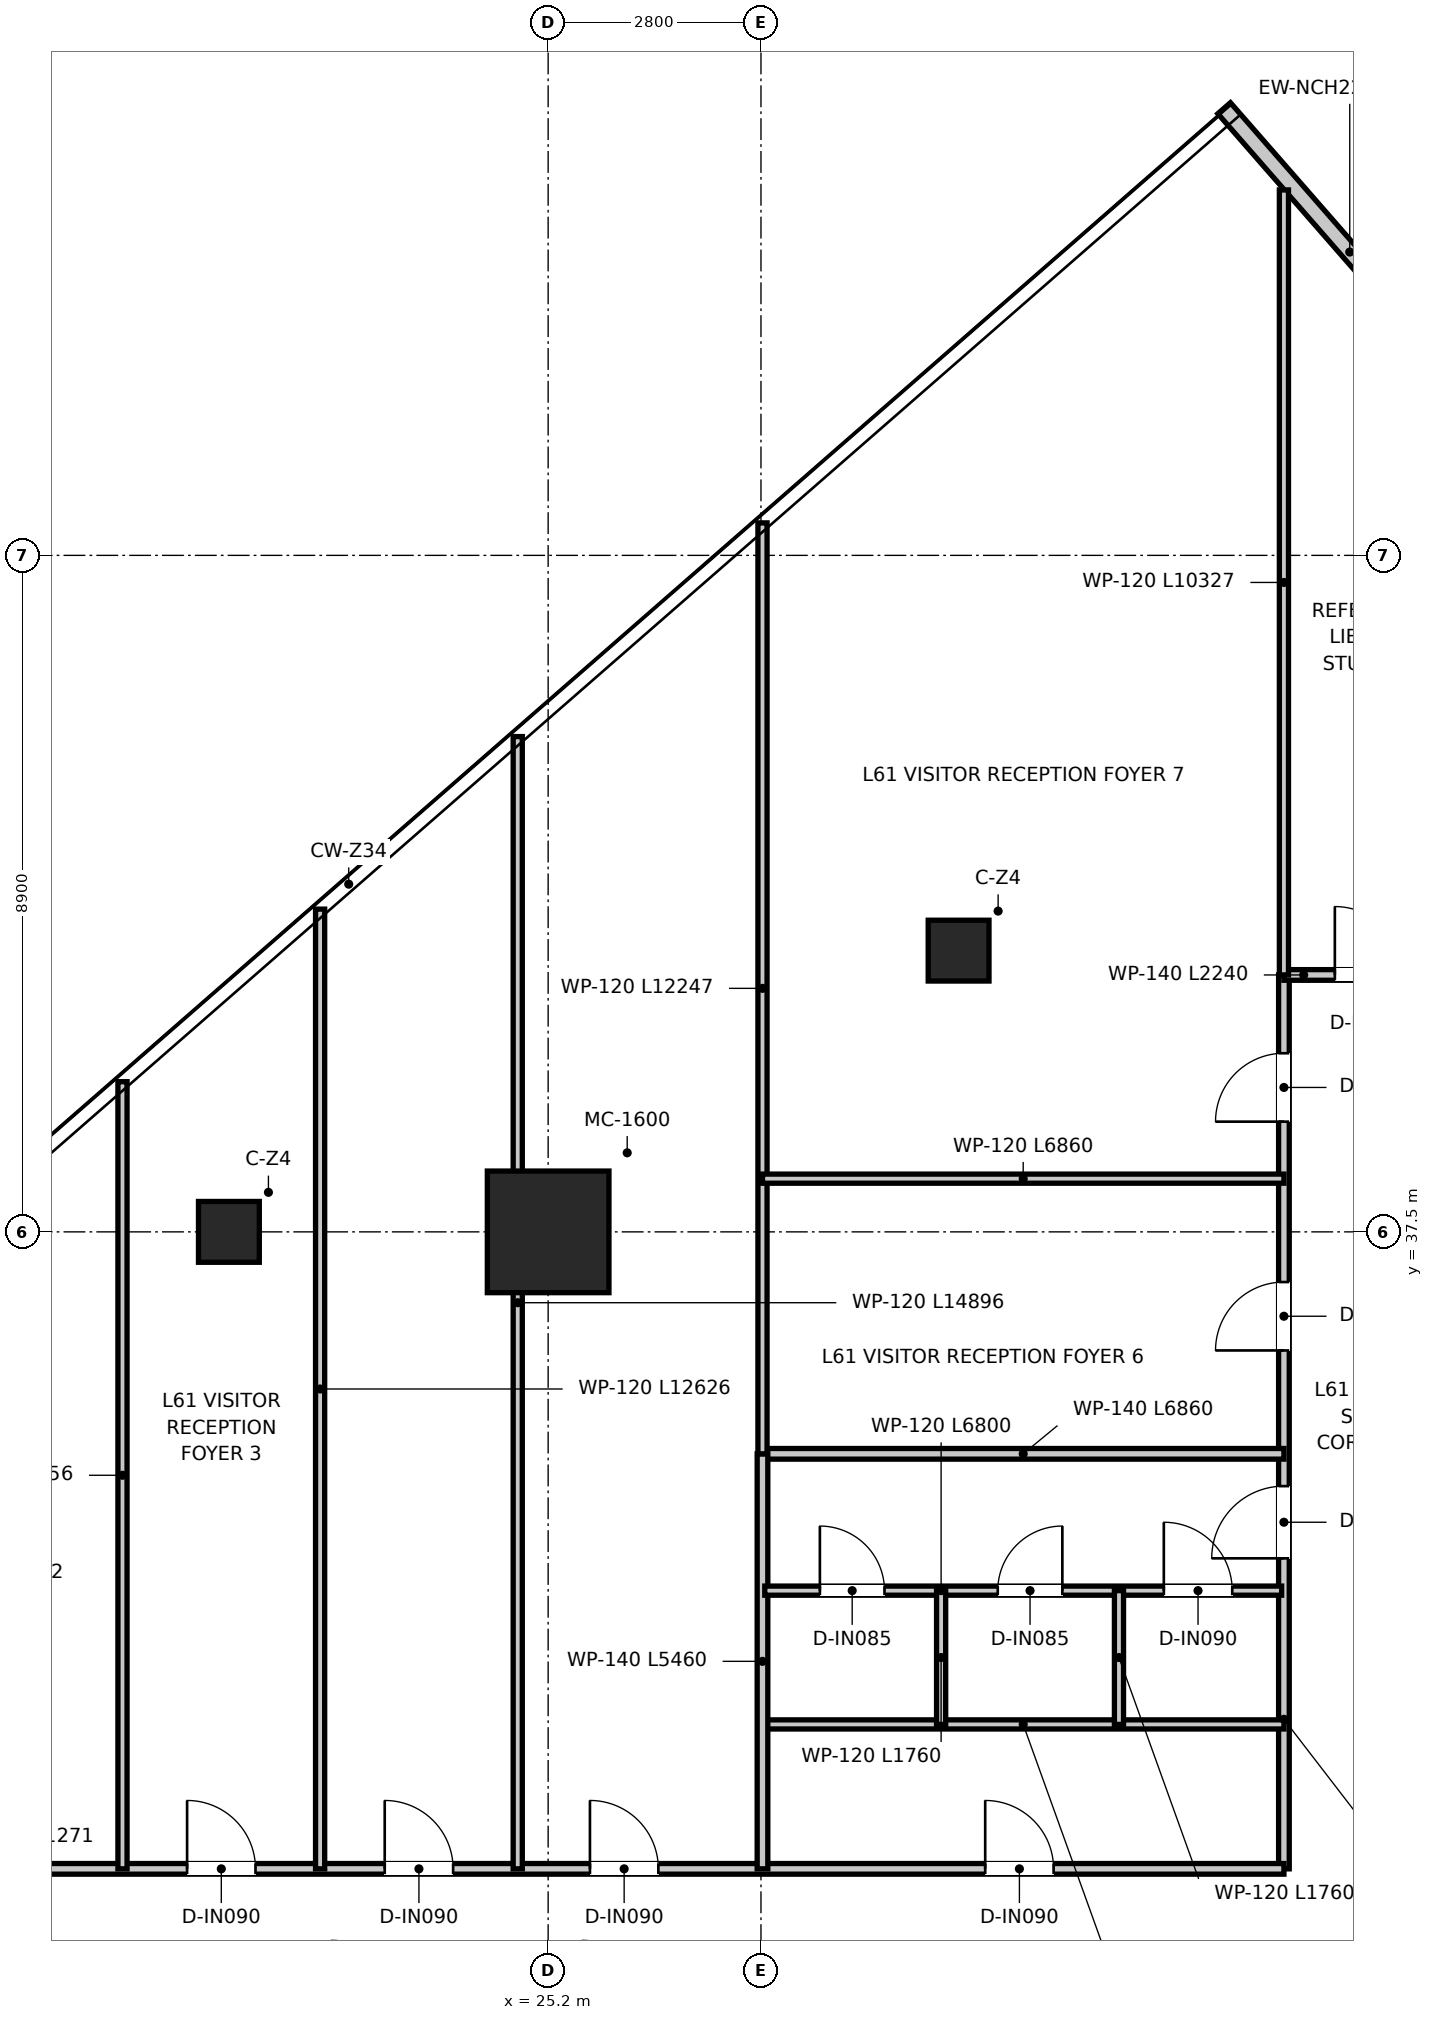
"""IFC4 building model, lengths in metres.
Left out: names, types, materials, properties, quantities, classifications, styles, units other than length and angle.
Written with IfcOpenShell. Run it as: python <this file> out.ifc"""

import sys

from ifc_helpers import new_model, si_unit, direction, frame, frame_2d, origin, origin_2d, place, context, subcontext, project, spatial, rectangle, extrude, source, transform, mapped, element, fill, save


model = new_model("IFC4")
c1 = context("Model", 3, precision=1e-05, world=origin(), true_north=direction((0.0, 1.0)))
c2 = subcontext(c1, "Body", "Model", "MODEL_VIEW")
j1 = project(units=[si_unit("LENGTHUNIT", "METRE"), si_unit("PLANEANGLEUNIT", "RADIAN")], contexts=[c1])
p1 = place(None, origin())
s1 = spatial("IfcSite", under=j1, at=p1, CompositionType="ELEMENT")
p2 = place(p1, origin())
s2 = spatial("IfcBuilding", under=s1, at=p2, CompositionType="ELEMENT")
p3 = place(p2, frame((0.0, 0.0, 250.75)))
s3 = spatial("IfcBuildingStorey", under=s2, at=p3, CompositionType="ELEMENT", Elevation=250.75)
m1 = source(origin(), c2, "Body", "SweptSolid", [
    extrude(rectangle(XDim=1.6, YDim=1.6, at=origin_2d()), origin(), (0.0, 0.0, 1.0), 3.95),
])
p4 = place(p3, frame((25.2, 37.5, 0.0), z_axis=(0.0, 0.0, 1.0), x_axis=(1.0, 0.0, 0.0)))
e1 = element("IfcColumn", 1, at=p4, inside=s3, PredefinedType="USERDEFINED", context=c2, shape_type="MappedRepresentation", body=[
    mapped(m1, transform((0.0, 0.0, 0.0), x_axis=(1.0, 0.0, 0.0), y_axis=(0.0, 1.0, 0.0), z_axis=(0.0, 0.0, 1.0), scale=1.0)),
])
m2 = source(origin(), c2, "Body", "SweptSolid", [
    extrude(rectangle(XDim=0.8, YDim=0.8, at=origin_2d()), origin(), (0.0, 0.0, 1.0), 3.95),
])
for number, where, z_axis, x_axis in (
    (2, (21.0, 37.5, 0.0), (0.0, 0.0, 1.0), (1.0, 0.0, 0.0)),
    (3, (30.6, 41.2, 0.0), (0.0, 0.0, 1.0), (1.0, 0.0, 0.0)),
):
    element("IfcColumn", number, at=place(p3, frame(where, z_axis=z_axis, x_axis=x_axis)), inside=s3, PredefinedType="COLUMN", context=c2, shape_type="MappedRepresentation", body=[
        mapped(m2, transform((0.0, 0.0, 0.0), x_axis=(1.0, 0.0, 0.0), y_axis=(0.0, 1.0, 0.0), z_axis=(0.0, 0.0, 1.0), scale=1.0)),
    ])
p5 = place(p3, frame((37.398, 48.498, 0.0), z_axis=(0.0, 0.0, 1.0), x_axis=(-0.657706226339, 0.753274531518, 0.0)))
e4 = element("IfcWall", 4, at=p5, inside=s3, PredefinedType="ELEMENTEDWALL", context=c2, shape_type="SweptSolid", body=[
    extrude(rectangle(XDim=5.025, YDim=0.22, at=frame_2d((2.512, 0.0))), origin(), (0.0, 0.0, 1.0), 3.67),
])
p6 = place(p3, frame((34.88, 29.12, 0.0), z_axis=(0.0, 0.0, 1.0), x_axis=(0.0, 1.0, 0.0)))
e5 = element("IfcWall", 5, at=p6, inside=s3, PredefinedType="PARTITIONING", context=c2, shape_type="SweptSolid", body=[
    extrude(rectangle(XDim=11.76, YDim=0.14, at=frame_2d((5.88, 0.0))), origin(), (0.0, 0.0, 1.0), 3.03),
])
p7 = place(p6, frame((4.085, 0.0, 0.0)))
e6 = element("IfcOpeningElement", 6, at=p7, cuts=e5, PredefinedType="OPENING", context=c2, shape_type="SweptSolid", body=[
    extrude(rectangle(XDim=0.95, YDim=2.1, at=frame_2d((0.475, 1.05))), frame((0.0, 0.08, 0.0), z_axis=(0.0, -1.0, 0.0), x_axis=(1.0, 0.0, 0.0)), (0.0, 0.0, 1.0), 0.16),
])
p8 = place(p6, frame((6.82, 0.0, 0.0)))
e7 = element("IfcOpeningElement", 7, at=p8, cuts=e5, PredefinedType="OPENING", context=c2, shape_type="SweptSolid", body=[
    extrude(rectangle(XDim=0.9, YDim=2.1, at=frame_2d((0.45, 1.05))), frame((0.0, 0.08, 0.0), z_axis=(0.0, -1.0, 0.0), x_axis=(1.0, 0.0, 0.0)), (0.0, 0.0, 1.0), 0.16),
])
p9 = place(p6, frame((9.83, 0.0, 0.0)))
e8 = element("IfcOpeningElement", 8, at=p9, cuts=e5, PredefinedType="OPENING", context=c2, shape_type="SweptSolid", body=[
    extrude(rectangle(XDim=0.9, YDim=2.1, at=frame_2d((0.45, 1.05))), frame((0.0, 0.08, 0.0), z_axis=(0.0, -1.0, 0.0), x_axis=(1.0, 0.0, 0.0)), (0.0, 0.0, 1.0), 0.16),
])
p10 = place(p3, frame((34.88, 40.88, 0.0), z_axis=(0.0, 0.0, 1.0), x_axis=(1.0, 0.0, 0.0)))
e9 = element("IfcWall", 9, at=p10, inside=s3, PredefinedType="PARTITIONING", context=c2, shape_type="SweptSolid", body=[
    extrude(rectangle(XDim=2.24, YDim=0.14, at=frame_2d((1.12, 0.0))), origin(), (0.0, 0.0, 1.0), 3.67),
])
p11 = place(p10, frame((0.67, 0.0, 0.0)))
e10 = element("IfcOpeningElement", 10, at=p11, cuts=e9, PredefinedType="OPENING", context=c2, shape_type="SweptSolid", body=[
    extrude(rectangle(XDim=0.9, YDim=2.1, at=frame_2d((0.45, 1.05))), frame((0.0, 0.08, 0.0), z_axis=(0.0, -1.0, 0.0), x_axis=(1.0, 0.0, 0.0)), (0.0, 0.0, 1.0), 0.16),
])
p12 = place(p3, frame((13.609, 29.12, 0.0), z_axis=(0.0, 0.0, 1.0), x_axis=(1.0, 0.0, 0.0)))
e11 = element("IfcWall", 11, at=p12, inside=s3, PredefinedType="PARTITIONING", context=c2, shape_type="SweptSolid", body=[
    extrude(rectangle(XDim=21.271, YDim=0.14, at=frame_2d((10.635, 0.0))), origin(), (0.0, 0.0, 1.0), 3.03),
])
p13 = place(p12, frame((17.341, 0.0, 0.0)))
e12 = element("IfcOpeningElement", 12, at=p13, cuts=e11, PredefinedType="OPENING", context=c2, shape_type="SweptSolid", body=[
    extrude(rectangle(XDim=0.9, YDim=2.1, at=frame_2d((0.45, 1.05))), frame((0.0, 0.08, 0.0), z_axis=(0.0, -1.0, 0.0), x_axis=(1.0, 0.0, 0.0)), (0.0, 0.0, 1.0), 0.16),
])
p14 = place(p12, frame((1.478, 0.0, 0.0)))
e13 = element("IfcOpeningElement", 13, at=p14, cuts=e11, PredefinedType="OPENING", context=c2, shape_type="SweptSolid", body=[
    extrude(rectangle(XDim=0.9, YDim=2.1, at=frame_2d((0.45, 1.05))), frame((0.0, 0.08, 0.0), z_axis=(0.0, -1.0, 0.0), x_axis=(1.0, 0.0, 0.0)), (0.0, 0.0, 1.0), 0.16),
])
p15 = place(p12, frame((6.841, 0.0, 0.0)))
e14 = element("IfcOpeningElement", 14, at=p15, cuts=e11, PredefinedType="OPENING", context=c2, shape_type="SweptSolid", body=[
    extrude(rectangle(XDim=0.9, YDim=2.1, at=frame_2d((0.45, 1.05))), frame((0.0, 0.08, 0.0), z_axis=(0.0, -1.0, 0.0), x_axis=(1.0, 0.0, 0.0)), (0.0, 0.0, 1.0), 0.16),
])
p16 = place(p12, frame((9.441, 0.0, 0.0)))
e15 = element("IfcOpeningElement", 15, at=p16, cuts=e11, PredefinedType="OPENING", context=c2, shape_type="SweptSolid", body=[
    extrude(rectangle(XDim=0.9, YDim=2.1, at=frame_2d((0.45, 1.05))), frame((0.0, 0.08, 0.0), z_axis=(0.0, -1.0, 0.0), x_axis=(1.0, 0.0, 0.0)), (0.0, 0.0, 1.0), 0.16),
])
p17 = place(p12, frame((12.141, 0.0, 0.0)))
e16 = element("IfcOpeningElement", 16, at=p17, cuts=e11, PredefinedType="OPENING", context=c2, shape_type="SweptSolid", body=[
    extrude(rectangle(XDim=0.9, YDim=2.1, at=frame_2d((0.45, 1.05))), frame((0.0, 0.08, 0.0), z_axis=(0.0, -1.0, 0.0), x_axis=(1.0, 0.0, 0.0)), (0.0, 0.0, 1.0), 0.16),
])
p18 = place(p3, frame((28.02, 31.02, 0.0), z_axis=(0.0, 0.0, 1.0), x_axis=(1.0, 0.0, 0.0)))
e17 = element("IfcWall", 17, at=p18, inside=s3, PredefinedType="PARTITIONING", context=c2, shape_type="SweptSolid", body=[
    extrude(rectangle(XDim=6.86, YDim=0.12, at=frame_2d((3.43, 0.0))), origin(), (0.0, 0.0, 1.0), 3.18),
])
p19 = place(p3, frame((28.02, 34.58, 0.0), z_axis=(0.0, 0.0, 1.0), x_axis=(1.0, 0.0, 0.0)))
e18 = element("IfcWall", 18, at=p19, inside=s3, PredefinedType="PARTITIONING", context=c2, shape_type="SweptSolid", body=[
    extrude(rectangle(XDim=6.86, YDim=0.14, at=frame_2d((3.43, 0.0))), origin(), (0.0, 0.0, 1.0), 3.18),
])
p20 = place(p3, frame((28.02, 29.12, 0.0), z_axis=(0.0, 0.0, 1.0), x_axis=(0.0, 1.0, 0.0)))
e19 = element("IfcWall", 19, at=p20, inside=s3, PredefinedType="PARTITIONING", context=c2, shape_type="SweptSolid", body=[
    extrude(rectangle(XDim=5.46, YDim=0.14, at=frame_2d((2.73, 0.0))), origin(), (0.0, 0.0, 1.0), 3.37),
])
p21 = place(p3, frame((28.05, 32.78, 0.0), z_axis=(0.0, 0.0, 1.0), x_axis=(1.0, 0.0, 0.0)))
e20 = element("IfcWall", 20, at=p21, inside=s3, PredefinedType="PARTITIONING", context=c2, shape_type="SweptSolid", body=[
    extrude(rectangle(XDim=6.8, YDim=0.12, at=frame_2d((3.4, 0.0))), origin(), (0.0, 0.0, 1.0), 3.18),
])
p22 = place(p21, frame((0.725, 0.0, 0.0)))
e21 = element("IfcOpeningElement", 21, at=p22, cuts=e20, PredefinedType="OPENING", context=c2, shape_type="SweptSolid", body=[
    extrude(rectangle(XDim=0.85, YDim=2.1, at=frame_2d((0.425, 1.05))), frame((0.0, 0.07, 0.0), z_axis=(0.0, -1.0, 0.0), x_axis=(1.0, 0.0, 0.0)), (0.0, 0.0, 1.0), 0.14),
])
p23 = place(p21, frame((3.065, 0.0, 0.0)))
e22 = element("IfcOpeningElement", 22, at=p23, cuts=e20, PredefinedType="OPENING", context=c2, shape_type="SweptSolid", body=[
    extrude(rectangle(XDim=0.85, YDim=2.1, at=frame_2d((0.425, 1.05))), frame((0.0, 0.07, 0.0), z_axis=(0.0, -1.0, 0.0), x_axis=(1.0, 0.0, 0.0)), (0.0, 0.0, 1.0), 0.14),
])
p24 = place(p21, frame((5.25, 0.0, 0.0)))
e23 = element("IfcOpeningElement", 23, at=p24, cuts=e20, PredefinedType="OPENING", context=c2, shape_type="SweptSolid", body=[
    extrude(rectangle(XDim=0.9, YDim=2.1, at=frame_2d((0.45, 1.05))), frame((0.0, 0.07, 0.0), z_axis=(0.0, -1.0, 0.0), x_axis=(1.0, 0.0, 0.0)), (0.0, 0.0, 1.0), 0.14),
])
p25 = place(p3, frame((30.37, 31.02, 0.0), z_axis=(0.0, 0.0, 1.0), x_axis=(0.0, 1.0, 0.0)))
e24 = element("IfcWall", 24, at=p25, inside=s3, PredefinedType="PARTITIONING", context=c2, shape_type="SweptSolid", body=[
    extrude(rectangle(XDim=1.76, YDim=0.12, at=frame_2d((0.88, 0.0))), origin(), (0.0, 0.0, 1.0), 3.18),
])
p26 = place(p3, frame((32.71, 31.02, 0.0), z_axis=(0.0, 0.0, 1.0), x_axis=(0.0, 1.0, 0.0)))
e25 = element("IfcWall", 25, at=p26, inside=s3, PredefinedType="PARTITIONING", context=c2, shape_type="SweptSolid", body=[
    extrude(rectangle(XDim=1.76, YDim=0.12, at=frame_2d((0.88, 0.0))), origin(), (0.0, 0.0, 1.0), 3.67),
])
p27 = place(p3, frame((34.88, 40.88, 0.0), z_axis=(0.0, 0.0, 1.0), x_axis=(0.0, 1.0, 0.0)))
e26 = element("IfcWall", 26, at=p27, inside=s3, PredefinedType="PARTITIONING", context=c2, shape_type="SweptSolid", body=[
    extrude(rectangle(XDim=10.328, YDim=0.12, at=frame_2d((5.164, 0.0))), origin(), (0.0, 0.0, 1.0), 3.28),
])
p28 = place(p3, frame((19.6, 29.12, 0.0), z_axis=(0.0, 0.0, 1.0), x_axis=(0.0, 1.0, 0.0)))
e27 = element("IfcWall", 27, at=p28, inside=s3, PredefinedType="PARTITIONING", context=c2, shape_type="SweptSolid", body=[
    extrude(rectangle(XDim=10.355, YDim=0.12, at=frame_2d((5.178, 0.0))), origin(), (0.0, 0.0, 1.0), 3.67),
])
p29 = place(p3, frame((22.2, 29.12, 0.0), z_axis=(0.0, 0.0, 1.0), x_axis=(0.0, 1.0, 0.0)))
e28 = element("IfcWall", 28, at=p29, inside=s3, PredefinedType="PARTITIONING", context=c2, shape_type="SweptSolid", body=[
    extrude(rectangle(XDim=12.626, YDim=0.12, at=frame_2d((6.313, 0.0))), origin(), (0.0, 0.0, 1.0), 3.18),
])
p30 = place(p3, frame((24.8, 29.12, 0.0), z_axis=(0.0, 0.0, 1.0), x_axis=(0.0, 1.0, 0.0)))
e29 = element("IfcWall", 29, at=p30, inside=s3, PredefinedType="PARTITIONING", context=c2, shape_type="SweptSolid", body=[
    extrude(rectangle(XDim=14.896, YDim=0.12, at=frame_2d((7.448, 0.0))), origin(), (0.0, 0.0, 1.0), 3.18),
])
p31 = place(p3, frame((28.02, 34.58, 0.0), z_axis=(0.0, 0.0, 1.0), x_axis=(0.0, 1.0, 0.0)))
e30 = element("IfcWall", 30, at=p31, inside=s3, PredefinedType="PARTITIONING", context=c2, shape_type="SweptSolid", body=[
    extrude(rectangle(XDim=12.247, YDim=0.12, at=frame_2d((6.124, 0.0))), origin(), (0.0, 0.0, 1.0), 3.03),
])
p32 = place(p3, frame((28.02, 38.2, 0.0), z_axis=(0.0, 0.0, 1.0), x_axis=(1.0, 0.0, 0.0)))
e31 = element("IfcWall", 31, at=p32, inside=s3, PredefinedType="PARTITIONING", context=c2, shape_type="SweptSolid", body=[
    extrude(rectangle(XDim=6.86, YDim=0.12, at=frame_2d((3.43, 0.0))), origin(), (0.0, 0.0, 1.0), 3.18),
])
p33 = place(p13, origin())
e32 = element("IfcDoor", 32, at=p33, inside=s3, OperationType="SINGLE_SWING_LEFT", PredefinedType="DOOR", context=c2, shape_type="SweptSolid", body=[
    extrude(rectangle(XDim=0.9, YDim=2.1, at=frame_2d((0.45, 1.05))), frame((0.0, 0.025, 0.0), z_axis=(0.0, -1.0, 0.0), x_axis=(1.0, 0.0, 0.0)), (0.0, 0.0, 1.0), 0.05),
])
fill(e12, e32)
p34 = place(p7, origin())
e33 = element("IfcDoor", 33, at=p34, inside=s3, OperationType="SINGLE_SWING_LEFT", PredefinedType="DOOR", context=c2, shape_type="SweptSolid", body=[
    extrude(rectangle(XDim=0.95, YDim=2.1, at=frame_2d((0.475, 1.05))), frame((0.0, 0.025, 0.0), z_axis=(0.0, -1.0, 0.0), x_axis=(1.0, 0.0, 0.0)), (0.0, 0.0, 1.0), 0.05),
])
fill(e6, e33)
p35 = place(p22, origin())
e34 = element("IfcDoor", 34, at=p35, inside=s3, OperationType="SINGLE_SWING_LEFT", PredefinedType="DOOR", context=c2, shape_type="SweptSolid", body=[
    extrude(rectangle(XDim=0.85, YDim=2.1, at=frame_2d((0.425, 1.05))), frame((0.0, 0.025, 0.0), z_axis=(0.0, -1.0, 0.0), x_axis=(1.0, 0.0, 0.0)), (0.0, 0.0, 1.0), 0.05),
])
fill(e21, e34)
p36 = place(p23, origin())
e35 = element("IfcDoor", 35, at=p36, inside=s3, OperationType="SINGLE_SWING_RIGHT", PredefinedType="DOOR", context=c2, shape_type="SweptSolid", body=[
    extrude(rectangle(XDim=0.85, YDim=2.1, at=frame_2d((0.425, 1.05))), frame((0.0, 0.025, 0.0), z_axis=(0.0, -1.0, 0.0), x_axis=(1.0, 0.0, 0.0)), (0.0, 0.0, 1.0), 0.05),
])
fill(e22, e35)
p37 = place(p24, origin())
e36 = element("IfcDoor", 36, at=p37, inside=s3, OperationType="SINGLE_SWING_LEFT", PredefinedType="DOOR", context=c2, shape_type="SweptSolid", body=[
    extrude(rectangle(XDim=0.9, YDim=2.1, at=frame_2d((0.45, 1.05))), frame((0.0, 0.025, 0.0), z_axis=(0.0, -1.0, 0.0), x_axis=(1.0, 0.0, 0.0)), (0.0, 0.0, 1.0), 0.05),
])
fill(e23, e36)
p38 = place(p11, origin())
e37 = element("IfcDoor", 37, at=p38, inside=s3, OperationType="SINGLE_SWING_LEFT", PredefinedType="DOOR", context=c2, shape_type="SweptSolid", body=[
    extrude(rectangle(XDim=0.9, YDim=2.1, at=frame_2d((0.45, 1.05))), frame((0.0, 0.025, 0.0), z_axis=(0.0, -1.0, 0.0), x_axis=(1.0, 0.0, 0.0)), (0.0, 0.0, 1.0), 0.05),
])
fill(e10, e37)
p39 = place(p15, origin())
e38 = element("IfcDoor", 38, at=p39, inside=s3, OperationType="SINGLE_SWING_LEFT", PredefinedType="DOOR", context=c2, shape_type="SweptSolid", body=[
    extrude(rectangle(XDim=0.9, YDim=2.1, at=frame_2d((0.45, 1.05))), frame((0.0, 0.025, 0.0), z_axis=(0.0, -1.0, 0.0), x_axis=(1.0, 0.0, 0.0)), (0.0, 0.0, 1.0), 0.05),
])
fill(e14, e38)
p40 = place(p16, origin())
e39 = element("IfcDoor", 39, at=p40, inside=s3, OperationType="SINGLE_SWING_LEFT", PredefinedType="DOOR", context=c2, shape_type="SweptSolid", body=[
    extrude(rectangle(XDim=0.9, YDim=2.1, at=frame_2d((0.45, 1.05))), frame((0.0, 0.025, 0.0), z_axis=(0.0, -1.0, 0.0), x_axis=(1.0, 0.0, 0.0)), (0.0, 0.0, 1.0), 0.05),
])
fill(e15, e39)
p41 = place(p17, origin())
e40 = element("IfcDoor", 40, at=p41, inside=s3, OperationType="SINGLE_SWING_LEFT", PredefinedType="DOOR", context=c2, shape_type="SweptSolid", body=[
    extrude(rectangle(XDim=0.9, YDim=2.1, at=frame_2d((0.45, 1.05))), frame((0.0, 0.025, 0.0), z_axis=(0.0, -1.0, 0.0), x_axis=(1.0, 0.0, 0.0)), (0.0, 0.0, 1.0), 0.05),
])
fill(e16, e40)
p42 = place(p8, origin())
e41 = element("IfcDoor", 41, at=p42, inside=s3, OperationType="SINGLE_SWING_LEFT", PredefinedType="DOOR", context=c2, shape_type="SweptSolid", body=[
    extrude(rectangle(XDim=0.9, YDim=2.1, at=frame_2d((0.45, 1.05))), frame((0.0, 0.025, 0.0), z_axis=(0.0, -1.0, 0.0), x_axis=(1.0, 0.0, 0.0)), (0.0, 0.0, 1.0), 0.05),
])
fill(e7, e41)
p43 = place(p9, origin())
e42 = element("IfcDoor", 42, at=p43, inside=s3, OperationType="SINGLE_SWING_LEFT", PredefinedType="DOOR", context=c2, shape_type="SweptSolid", body=[
    extrude(rectangle(XDim=0.9, YDim=2.1, at=frame_2d((0.45, 1.05))), frame((0.0, 0.025, 0.0), z_axis=(0.0, -1.0, 0.0), x_axis=(1.0, 0.0, 0.0)), (0.0, 0.0, 1.0), 0.05),
])
fill(e8, e42)
save(model, sys.argv[1])
